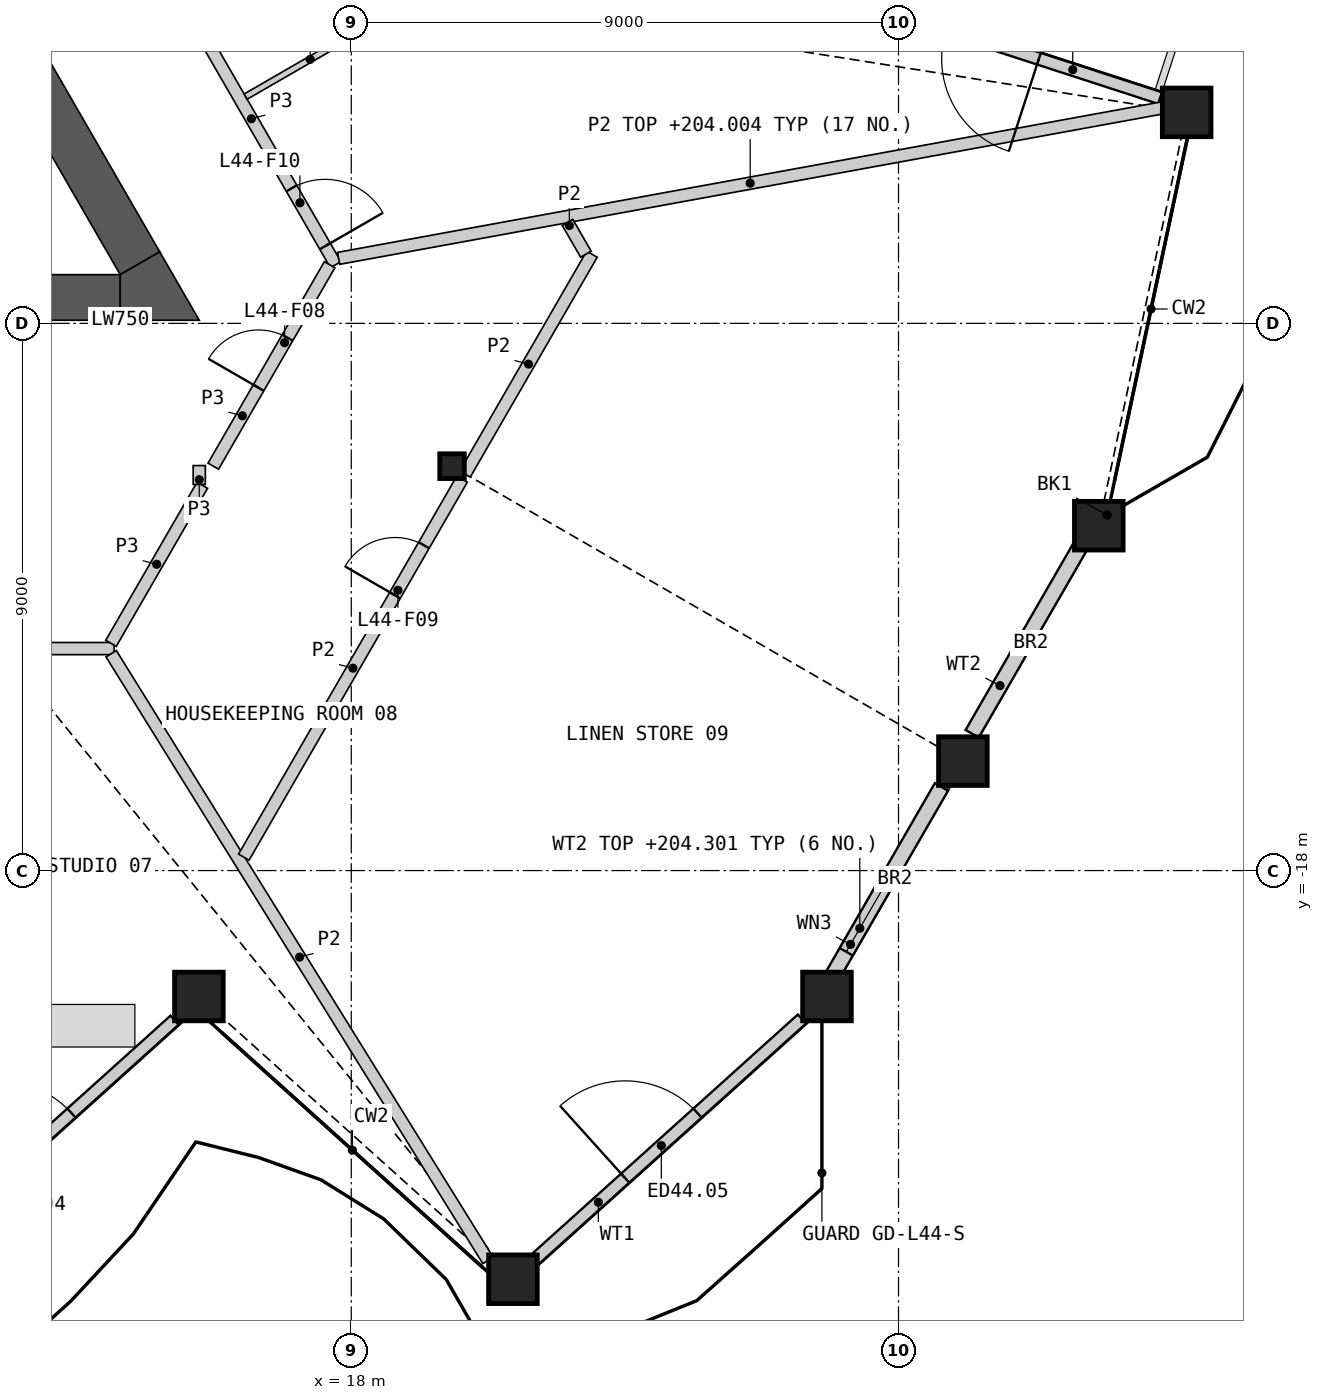
"""IFC4 building model, lengths in metres.
Left out: names, types, materials, properties, quantities, classifications, styles, units other than length and angle.
Written with IfcOpenShell. Run it as: python <this file> out.ifc"""

import sys

from ifc_helpers import new_model, si_unit, direction, frame, frame_2d, origin, origin_2d, place, context, subcontext, project, spatial, polyline, rectangle, hollow_rectangle, i_section, outline, extrude, element, fill, save


model = new_model("IFC4")
c1 = context("Model", 3, precision=1e-05, world=origin(), true_north=direction((0.0, 1.0)))
c2 = subcontext(c1, "Body", "Model", "MODEL_VIEW")
j1 = project(units=[si_unit("LENGTHUNIT", "METRE"), si_unit("PLANEANGLEUNIT", "RADIAN")], contexts=[c1])
p1 = place(None, origin())
s1 = spatial("IfcSite", under=j1, at=p1, CompositionType="ELEMENT")
p2 = place(p1, origin())
s2 = spatial("IfcBuilding", under=s1, at=p2, CompositionType="ELEMENT")
p3 = place(p2, frame((0.0, 0.0, 201.6)))
s3 = spatial("IfcBuildingStorey", under=s2, at=p3, CompositionType="ELEMENT", Elevation=201.6)
for number, where, z_axis, x_axis in (
    (1, (15.494, -20.071, 0.0), (0.0, 0.0, 1.0), (1.0, 0.0, 0.0)),
    (2, (20.659, -24.722, 0.0), (0.0, 0.0, 1.0), (1.0, 0.0, 0.0)),
    (3, (25.823, -20.071, 0.0), (0.0, 0.0, 1.0), (1.0, 0.0, 0.0)),
    (4, (28.059, -16.2, 0.0), (0.0, 0.0, 1.0), (1.0, 0.0, 0.0)),
    (5, (30.294, -12.328, 0.0), (0.0, 0.0, 1.0), (1.0, 0.0, 0.0)),
    (6, (31.739, -5.53, 0.0), (0.0, 0.0, 1.0), (1.0, 0.0, 0.0)),
):
    element("IfcColumn", number, at=place(p3, frame(where, z_axis=z_axis, x_axis=x_axis)), inside=s3, PredefinedType="COLUMN", context=c2, shape_type="SweptSolid", body=[
        extrude(hollow_rectangle(XDim=0.8, YDim=0.8, WallThickness=0.05, at=origin_2d()), origin(), (0.0, 0.0, 1.0), 3.6),
    ])
p4 = place(p3, frame((19.657, -11.349, 0.0), z_axis=(0.0, 0.0, 1.0), x_axis=(1.0, 0.0, 0.0)))
e7 = element("IfcColumn", 7, at=p4, inside=s3, PredefinedType="COLUMN", context=c2, shape_type="SweptSolid", body=[
    extrude(i_section(OverallWidth=0.404, OverallDepth=0.407, WebThickness=0.027, FlangeThickness=0.044, at=origin_2d()), origin(), (0.0, 0.0, 1.0), 3.6),
])
p5 = place(p3, frame((10.651, -24.461, 0.0), z_axis=(0.0, 0.0, 1.0), x_axis=(0.743135744435, 0.669140691741, 0.0)))
e8 = element("IfcWall", 8, at=p5, inside=s3, PredefinedType="SOLIDWALL", context=c2, shape_type="SweptSolid", body=[
    extrude(rectangle(XDim=5.979, YDim=0.2, at=frame_2d((2.989, 0.0))), origin(), (0.0, 0.0, 1.0), 2.701),
])
p6 = place(p5, frame((2.096, 0.0, 0.0)))
e9 = element("IfcOpeningElement", 9, at=p6, cuts=e8, PredefinedType="OPENING", context=c2, shape_type="SweptSolid", body=[
    extrude(rectangle(XDim=1.6, YDim=2.4, at=frame_2d((0.8, 1.2))), frame((0.0, 0.11, 0.0), z_axis=(0.0, -1.0, 0.0), x_axis=(1.0, 0.0, 0.0)), (0.0, 0.0, 1.0), 0.22),
])
p7 = place(p3, frame((20.947, -24.461, 0.0), z_axis=(0.0, 0.0, 1.0), x_axis=(0.743162770969, 0.669110675333, 0.0)))
e10 = element("IfcWall", 10, at=p7, inside=s3, PredefinedType="SOLIDWALL", context=c2, shape_type="SweptSolid", body=[
    extrude(rectangle(XDim=6.007, YDim=0.2, at=frame_2d((3.003, 0.0))), origin(), (0.0, 0.0, 1.0), 2.701),
])
p8 = place(p7, frame((2.096, 0.0, 0.0)))
e11 = element("IfcOpeningElement", 11, at=p8, cuts=e10, PredefinedType="OPENING", context=c2, shape_type="SweptSolid", body=[
    extrude(rectangle(XDim=1.6, YDim=2.4, at=frame_2d((0.8, 1.2))), frame((0.0, 0.11, 0.0), z_axis=(0.0, -1.0, 0.0), x_axis=(1.0, 0.0, 0.0)), (0.0, 0.0, 1.0), 0.22),
])
p9 = place(p3, frame((25.916, -19.726, 0.0), z_axis=(0.0, 0.0, 1.0), x_axis=(0.500054932303, 0.865993686281, 0.0)))
e12 = element("IfcWall", 12, at=p9, inside=s3, PredefinedType="SOLIDWALL", context=c2, shape_type="SweptSolid", body=[
    extrude(rectangle(XDim=3.581, YDim=0.25, at=frame_2d((1.79, 0.0))), origin(), (0.0, 0.0, 1.0), 2.701),
])
p10 = place(p9, frame((0.45, 0.0, 1.7)))
e13 = element("IfcOpeningElement", 13, at=p10, cuts=e12, PredefinedType="OPENING", context=c2, shape_type="SweptSolid", body=[
    extrude(rectangle(XDim=1.4, YDim=0.8, at=frame_2d((0.7, 0.4))), frame((0.0, 0.135, 0.0), z_axis=(0.0, -1.0, 0.0), x_axis=(1.0, 0.0, 0.0)), (0.0, 0.0, 1.0), 0.27),
])
p11 = place(p3, frame((28.211, -15.75, 0.0), z_axis=(0.0, 0.0, 1.0), x_axis=(0.499978523533, 0.866037802874, 0.0)))
e14 = element("IfcWall", 14, at=p11, inside=s3, PredefinedType="SOLIDWALL", context=c2, shape_type="SweptSolid", body=[
    extrude(rectangle(XDim=3.659, YDim=0.25, at=frame_2d((1.83, 0.0))), origin(), (0.0, 0.0, 1.0), 2.701),
])
p12 = place(p3, frame((31.302, -5.295, 0.0), z_axis=(0.0, 0.0, 1.0), x_axis=(-0.951059297078, 0.309008435874, 0.0)))
e15 = element("IfcWall", 15, at=p12, inside=s3, PredefinedType="SOLIDWALL", context=c2, shape_type="SweptSolid", body=[
    extrude(rectangle(XDim=6.044, YDim=0.2, at=frame_2d((3.022, 0.0))), origin(), (0.0, 0.0, 1.0), 2.404),
])
p13 = place(p12, frame((2.096, 0.0, 0.0)))
e16 = element("IfcOpeningElement", 16, at=p13, cuts=e15, PredefinedType="OPENING", context=c2, shape_type="SweptSolid", body=[
    extrude(rectangle(XDim=1.6, YDim=2.4, at=frame_2d((0.8, 1.2))), frame((0.0, 0.11, 0.0), z_axis=(0.0, -1.0, 0.0), x_axis=(1.0, 0.0, 0.0)), (0.0, 0.0, 1.0), 0.22),
])
p14 = place(p3, frame((10.525, -8.574, 0.0), z_axis=(0.0, 0.0, 1.0), x_axis=(1.0, 0.0, 0.0)))
e17 = element("IfcWall", 17, at=p14, inside=s3, PredefinedType="SHEAR", context=c2, shape_type="SweptSolid", body=[
    extrude(rectangle(XDim=3.676, YDim=0.75, at=frame_2d((1.838, 0.0))), origin(), (0.0, 0.0, 1.0), 3.25),
])
p15 = place(p3, frame((14.526, -8.011, 0.0), z_axis=(0.0, 0.0, 1.0), x_axis=(-0.499996012963, 0.866027705689, 0.0)))
e18 = element("IfcWall", 18, at=p15, inside=s3, PredefinedType="SHEAR", context=c2, shape_type="SweptSolid", body=[
    extrude(rectangle(XDim=15.039, YDim=0.75, at=frame_2d((7.519, 0.0))), origin(), (0.0, 0.0, 1.0), 3.25),
])
p16 = place(p3, origin())
e19 = element("IfcWall", 19, at=p16, inside=s3, PredefinedType="SHEAR", context=c2, shape_type="SweptSolid", body=[
    extrude(outline(polyline([(14.201, -8.949), (14.201, -8.199), (14.851, -7.824), (15.5, -8.949), (14.201, -8.949)])), origin(), (0.0, 0.0, 1.0), 3.25),
])
p17 = place(p3, frame((-14.099, -14.349, 0.0), z_axis=(0.0, 0.0, 1.0), x_axis=(1.0, 0.0, 0.0)))
e20 = element("IfcWall", 20, at=p17, inside=s3, PredefinedType="PARTITIONING", context=c2, shape_type="SweptSolid", body=[
    extrude(rectangle(XDim=28.198, YDim=0.2, at=frame_2d((14.099, 0.0))), origin(), (0.0, 0.0, 1.0), 3.25),
])
p18 = place(p17, frame((1.053, 0.0, 0.0)))
e21 = element("IfcOpeningElement", 21, at=p18, cuts=e20, PredefinedType="OPENING", context=c2, shape_type="SweptSolid", body=[
    extrude(rectangle(XDim=1.8, YDim=2.1, at=frame_2d((0.9, 1.05))), frame((0.0, 0.11, 0.0), z_axis=(0.0, -1.0, 0.0), x_axis=(1.0, 0.0, 0.0)), (0.0, 0.0, 1.0), 0.22),
])
p19 = place(p17, frame((4.064, 0.0, 0.0)))
e22 = element("IfcOpeningElement", 22, at=p19, cuts=e20, PredefinedType="OPENING", context=c2, shape_type="SweptSolid", body=[
    extrude(rectangle(XDim=1.0, YDim=2.1, at=frame_2d((0.5, 1.05))), frame((0.0, 0.11, 0.0), z_axis=(0.0, -1.0, 0.0), x_axis=(1.0, 0.0, 0.0)), (0.0, 0.0, 1.0), 0.22),
])
p20 = place(p17, frame((12.796, 0.0, 0.0)))
e23 = element("IfcOpeningElement", 23, at=p20, cuts=e20, PredefinedType="OPENING", context=c2, shape_type="SweptSolid", body=[
    extrude(rectangle(XDim=1.0, YDim=2.1, at=frame_2d((0.5, 1.05))), frame((0.0, 0.11, 0.0), z_axis=(0.0, -1.0, 0.0), x_axis=(1.0, 0.0, 0.0)), (0.0, 0.0, 1.0), 0.22),
])
p21 = place(p17, frame((18.318, 0.0, 0.0)))
e24 = element("IfcOpeningElement", 24, at=p21, cuts=e20, PredefinedType="OPENING", context=c2, shape_type="SweptSolid", body=[
    extrude(rectangle(XDim=1.8, YDim=2.1, at=frame_2d((0.9, 1.05))), frame((0.0, 0.11, 0.0), z_axis=(0.0, -1.0, 0.0), x_axis=(1.0, 0.0, 0.0)), (0.0, 0.0, 1.0), 0.22),
])
p22 = place(p17, frame((25.345, 0.0, 0.0)))
e25 = element("IfcOpeningElement", 25, at=p22, cuts=e20, PredefinedType="OPENING", context=c2, shape_type="SweptSolid", body=[
    extrude(rectangle(XDim=1.8, YDim=2.1, at=frame_2d((0.9, 1.05))), frame((0.0, 0.11, 0.0), z_axis=(0.0, -1.0, 0.0), x_axis=(1.0, 0.0, 0.0)), (0.0, 0.0, 1.0), 0.22),
])
p23 = place(p3, frame((14.971, -3.233, 0.0), z_axis=(0.0, 0.0, 1.0), x_axis=(0.500003221507, -0.866023543838, 0.0)))
e26 = element("IfcWall", 26, at=p23, inside=s3, PredefinedType="PARTITIONING", context=c2, shape_type="SweptSolid", body=[
    extrude(rectangle(XDim=5.545, YDim=0.2, at=frame_2d((2.772, 0.0))), origin(), (0.0, 0.0, 1.0), 3.25),
])
p24 = place(p23, frame((4.094, 0.0, 0.0)))
e27 = element("IfcOpeningElement", 27, at=p24, cuts=e26, PredefinedType="OPENING", context=c2, shape_type="SweptSolid", body=[
    extrude(rectangle(XDim=1.1, YDim=2.1, at=frame_2d((0.55, 1.05))), frame((0.0, 0.11, 0.0), z_axis=(0.0, -1.0, 0.0), x_axis=(1.0, 0.0, 0.0)), (0.0, 0.0, 1.0), 0.22),
])
p25 = place(p3, frame((15.731, -11.349, 0.0), z_axis=(0.0, 0.0, 1.0), x_axis=(0.499961815444, 0.866047448526, 0.0)))
e28 = element("IfcWall", 28, at=p25, inside=s3, PredefinedType="PARTITIONING", context=c2, shape_type="SweptSolid", body=[
    extrude(rectangle(XDim=3.826, YDim=0.2, at=frame_2d((1.913, 0.0))), origin(), (0.0, 0.0, 1.0), 3.25),
])
p26 = place(p25, frame((1.49, 0.0, 0.0)))
e29 = element("IfcOpeningElement", 29, at=p26, cuts=e28, PredefinedType="OPENING", context=c2, shape_type="SweptSolid", body=[
    extrude(rectangle(XDim=0.95, YDim=2.1, at=frame_2d((0.475, 1.05))), frame((0.0, 0.11, 0.0), z_axis=(0.0, -1.0, 0.0), x_axis=(1.0, 0.0, 0.0)), (0.0, 0.0, 1.0), 0.22),
])
p27 = place(p3, frame((14.049, -14.262, 0.0), z_axis=(0.0, 0.0, 1.0), x_axis=(0.500048608389, 0.865997337899, 0.0)))
e30 = element("IfcWall", 30, at=p27, inside=s3, PredefinedType="PARTITIONING", context=c2, shape_type="SweptSolid", body=[
    extrude(rectangle(XDim=3.002, YDim=0.2, at=frame_2d((1.501, 0.0))), origin(), (0.0, 0.0, 1.0), 3.25),
])
p28 = place(p3, frame((15.5, -11.649, 0.0), z_axis=(0.0, 0.0, 1.0), x_axis=(0.0, 1.0, 0.0)))
e31 = element("IfcWall", 31, at=p28, inside=s3, PredefinedType="PARTITIONING", context=c2, shape_type="SweptSolid", body=[
    extrude(rectangle(XDim=0.31, YDim=0.2, at=frame_2d((0.155, 0.0))), origin(), (0.0, 0.0, 1.0), 3.25),
])
p29 = place(p3, frame((17.792, -7.931, 0.0), z_axis=(0.0, 0.0, 1.0), x_axis=(0.983720538919, 0.179705039744, 0.0)))
e32 = element("IfcWall", 32, at=p29, inside=s3, PredefinedType="PARTITIONING", context=c2, shape_type="SweptSolid", body=[
    extrude(rectangle(XDim=13.761, YDim=0.2, at=frame_2d((6.88, 0.0))), origin(), (0.0, 0.0, 1.0), 2.404),
])
p30 = place(p3, frame((14.052, -14.434, 0.0), z_axis=(0.0, 0.0, 1.0), x_axis=(0.527581174538, -0.849504622868, 0.0)))
e33 = element("IfcWall", 33, at=p30, inside=s3, PredefinedType="PARTITIONING", context=c2, shape_type="SweptSolid", body=[
    extrude(rectangle(XDim=11.747, YDim=0.2, at=frame_2d((5.873, 0.0))), origin(), (0.0, 0.0, 1.0), 2.404),
])
p31 = place(p3, frame((16.233, -17.779, 0.0), z_axis=(0.0, 0.0, 1.0), x_axis=(0.500008997517, 0.866020209003, 0.0)))
e34 = element("IfcWall", 34, at=p31, inside=s3, PredefinedType="PARTITIONING", context=c2, shape_type="SweptSolid", body=[
    extrude(rectangle(XDim=7.178, YDim=0.2, at=frame_2d((3.589, 0.0))), origin(), (0.0, 0.0, 1.0), 2.404),
])
p32 = place(p31, frame((4.973, 0.0, 0.0)))
e35 = element("IfcOpeningElement", 35, at=p32, cuts=e34, PredefinedType="OPENING", context=c2, shape_type="SweptSolid", body=[
    extrude(rectangle(XDim=0.95, YDim=2.1, at=frame_2d((0.475, 1.05))), frame((0.0, 0.11, 0.0), z_axis=(0.0, -1.0, 0.0), x_axis=(1.0, 0.0, 0.0)), (0.0, 0.0, 1.0), 0.22),
])
p33 = place(p3, frame((19.871, -11.479, 0.0), z_axis=(0.0, 0.0, 1.0), x_axis=(0.499987304225, 0.866032733569, 0.0)))
e36 = element("IfcWall", 36, at=p33, inside=s3, PredefinedType="PARTITIONING", context=c2, shape_type="SweptSolid", body=[
    extrude(rectangle(XDim=4.176, YDim=0.2, at=frame_2d((2.088, 0.0))), origin(), (0.0, 0.0, 1.0), 2.404),
])
p34 = place(p3, frame((21.556, -7.339, 0.0), z_axis=(0.0, 0.0, 1.0), x_axis=(0.50022374246, -0.865896187473, 0.0)))
e37 = element("IfcWall", 37, at=p34, inside=s3, PredefinedType="PARTITIONING", context=c2, shape_type="SweptSolid", body=[
    extrude(rectangle(XDim=0.604, YDim=0.2, at=frame_2d((0.302, 0.0))), origin(), (0.0, 0.0, 1.0), 2.404),
])
p35 = place(p3, frame((16.263, -5.271, 0.0), z_axis=(0.0, 0.0, 1.0), x_axis=(0.866057815567, 0.499943856944, 0.0)))
e38 = element("IfcWall", 38, at=p35, inside=s3, PredefinedType="PARTITIONING", context=c2, shape_type="SweptSolid", body=[
    extrude(rectangle(XDim=2.45, YDim=0.1, at=frame_2d((1.225, 0.0))), origin(), (0.0, 0.0, 1.0), 2.404),
])
p36 = place(p6, origin())
e39 = element("IfcDoor", 39, at=p36, inside=s3, OperationType="DOUBLE_DOOR_SINGLE_SWING", PredefinedType="DOOR", context=c2, shape_type="SweptSolid", body=[
    extrude(rectangle(XDim=1.6, YDim=2.4, at=frame_2d((0.8, 1.2))), frame((0.0, 0.025, 0.0), z_axis=(0.0, -1.0, 0.0), x_axis=(1.0, 0.0, 0.0)), (0.0, 0.0, 1.0), 0.05),
])
fill(e9, e39)
p37 = place(p8, origin())
e40 = element("IfcDoor", 40, at=p37, inside=s3, OperationType="DOUBLE_DOOR_SINGLE_SWING", PredefinedType="DOOR", context=c2, shape_type="SweptSolid", body=[
    extrude(rectangle(XDim=1.6, YDim=2.4, at=frame_2d((0.8, 1.2))), frame((0.0, 0.025, 0.0), z_axis=(0.0, -1.0, 0.0), x_axis=(1.0, 0.0, 0.0)), (0.0, 0.0, 1.0), 0.05),
])
fill(e11, e40)
p38 = place(p10, origin())
e41 = element("IfcWindow", 41, at=p38, inside=s3, PartitioningType="SINGLE_PANEL", PredefinedType="WINDOW", context=c2, shape_type="SweptSolid", body=[
    extrude(rectangle(XDim=1.4, YDim=0.8, at=frame_2d((0.7, 0.4))), frame((0.0, 0.03, 0.0), z_axis=(0.0, -1.0, 0.0), x_axis=(1.0, 0.0, 0.0)), (0.0, 0.0, 1.0), 0.06),
])
fill(e13, e41)
p39 = place(p13, origin())
e42 = element("IfcDoor", 42, at=p39, inside=s3, OperationType="DOUBLE_DOOR_SINGLE_SWING", PredefinedType="DOOR", context=c2, shape_type="SweptSolid", body=[
    extrude(rectangle(XDim=1.6, YDim=2.4, at=frame_2d((0.8, 1.2))), frame((0.0, 0.025, 0.0), z_axis=(0.0, -1.0, 0.0), x_axis=(1.0, 0.0, 0.0)), (0.0, 0.0, 1.0), 0.05),
])
fill(e16, e42)
p40 = place(p26, origin())
e43 = element("IfcDoor", 43, at=p40, inside=s3, OperationType="SINGLE_SWING_LEFT", PredefinedType="DOOR", context=c2, shape_type="SweptSolid", body=[
    extrude(rectangle(XDim=0.95, YDim=2.1, at=frame_2d((0.475, 1.05))), frame((0.0, 0.025, 0.0), z_axis=(0.0, -1.0, 0.0), x_axis=(1.0, 0.0, 0.0)), (0.0, 0.0, 1.0), 0.05),
])
fill(e29, e43)
p41 = place(p32, origin())
e44 = element("IfcDoor", 44, at=p41, inside=s3, OperationType="SINGLE_SWING_LEFT", PredefinedType="DOOR", context=c2, shape_type="SweptSolid", body=[
    extrude(rectangle(XDim=0.95, YDim=2.1, at=frame_2d((0.475, 1.05))), frame((0.0, 0.025, 0.0), z_axis=(0.0, -1.0, 0.0), x_axis=(1.0, 0.0, 0.0)), (0.0, 0.0, 1.0), 0.05),
])
fill(e35, e44)
p42 = place(p24, origin())
e45 = element("IfcDoor", 45, at=p42, inside=s3, OperationType="SINGLE_SWING_RIGHT", PredefinedType="DOOR", context=c2, shape_type="SweptSolid", body=[
    extrude(rectangle(XDim=1.1, YDim=2.1, at=frame_2d((0.55, 1.05))), frame((0.0, 0.025, 0.0), z_axis=(0.0, -1.0, 0.0), x_axis=(1.0, 0.0, 0.0)), (0.0, 0.0, 1.0), 0.05),
])
fill(e27, e45)
save(model, sys.argv[1])
